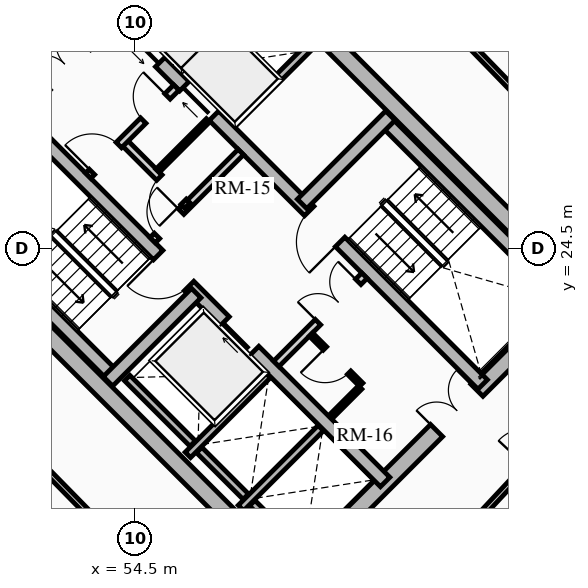
"""IFC4 building model, lengths in metres.
Left out: names, types, materials, properties, quantities, classifications, styles, units other than length and angle.
Written with IfcOpenShell. Run it as: python <this file> out.ifc"""

import sys

from ifc_helpers import new_model, si_unit, direction, frame, frame_2d, origin, place, context, subcontext, project, spatial, rectangle, extrude, source, transform, mapped, element, fill, save


model = new_model("IFC4")
c1 = context("Model", 3, precision=1e-05, world=origin(), true_north=direction((0.0, 1.0)))
c2 = subcontext(c1, "Body", "Model", "MODEL_VIEW")
j1 = project(units=[si_unit("LENGTHUNIT", "METRE"), si_unit("PLANEANGLEUNIT", "RADIAN")], contexts=[c1])
p1 = place(None, origin())
s1 = spatial("IfcSite", under=j1, at=p1, CompositionType="ELEMENT")
p2 = place(p1, origin())
s2 = spatial("IfcBuilding", under=s1, at=p2, CompositionType="ELEMENT")
p3 = place(p2, frame((0.0, 0.0, 73.06)))
s3 = spatial("IfcBuildingStorey", under=s2, at=p3, CompositionType="ELEMENT", Elevation=73.06)
for number, where, z_axis, x_axis in (
    (1, (58.737, 15.697, 0.0), (0.0, 0.0, 1.0), (-0.707, 0.707, 0.0)),
    (2, (66.303, 23.263, 0.0), (0.0, 0.0, 1.0), (-0.707, 0.707, 0.0)),
):
    element("IfcWall", number, at=place(p3, frame(where, z_axis=z_axis, x_axis=x_axis)), inside=s3, PredefinedType="SHEAR", context=c2, shape_type="SweptSolid", body=[
        extrude(rectangle(XDim=14.2, YDim=0.45, at=frame_2d((7.1, 0.0))), origin(), (0.0, 0.0, 1.0), 2.91),
    ])
p4 = place(p3, frame((58.578, 15.856, 0.0), z_axis=(0.0, 0.0, 1.0), x_axis=(0.707106781187, 0.707106781187, 0.0)))
e3 = element("IfcWall", 3, at=p4, inside=s3, PredefinedType="SHEAR", context=c2, shape_type="SweptSolid", body=[
    extrude(rectangle(XDim=10.7, YDim=0.45, at=frame_2d((5.35, 0.0))), origin(), (0.0, 0.0, 1.0), 2.91),
])
m1 = source(origin(), c2, "Body", "SweptSolid", [
    extrude(rectangle(XDim=1.5, YDim=2.02, at=frame_2d((0.75, 1.01))), frame((0.0, 0.235, 0.0), z_axis=(0.0, -1.0, 0.0), x_axis=(1.0, 0.0, 0.0)), (0.0, 0.0, 1.0), 0.47),
])
p5 = place(p4, frame((5.45, 0.0, 0.0)))
e4 = element("IfcOpeningElement", 4, at=p5, cuts=e3, PredefinedType="OPENING", context=c2, shape_type="MappedRepresentation", body=[
    mapped(m1, transform((0.0, 0.0, 0.0), x_axis=(1.0, 0.0, 0.0), y_axis=(0.0, 1.0, 0.0), z_axis=(0.0, 0.0, 1.0), scale=1.0)),
])
p6 = place(p3, frame((48.856, 25.578, 0.0), z_axis=(0.0, 0.0, 1.0), x_axis=(0.707106781187, 0.707106781187, 0.0)))
e5 = element("IfcWall", 5, at=p6, inside=s3, PredefinedType="SHEAR", context=c2, shape_type="SweptSolid", body=[
    extrude(rectangle(XDim=10.7, YDim=0.45, at=frame_2d((5.35, 0.0))), origin(), (0.0, 0.0, 1.0), 2.91),
])
p7 = place(p6, frame((4.6, 0.0, 0.0)))
e6 = element("IfcOpeningElement", 6, at=p7, cuts=e5, PredefinedType="OPENING", context=c2, shape_type="MappedRepresentation", body=[
    mapped(m1, transform((0.0, 0.0, 0.0), x_axis=(1.0, 0.0, 0.0), y_axis=(0.0, 1.0, 0.0), z_axis=(0.0, 0.0, 1.0), scale=1.0)),
])
p8 = place(p3, frame((61.078, 18.355, 0.0), z_axis=(0.0, 0.0, 1.0), x_axis=(-0.707106781187, 0.707106781187, 0.0)))
e7 = element("IfcWall", 7, at=p8, inside=s3, PredefinedType="SHEAR", context=c2, shape_type="SweptSolid", body=[
    extrude(rectangle(XDim=13.75, YDim=0.35, at=frame_2d((6.875, 0.0))), origin(), (0.0, 0.0, 1.0), 2.91),
])
m2 = source(origin(), c2, "Body", "SweptSolid", [
    extrude(rectangle(XDim=1.1, YDim=2.015, at=frame_2d((0.55, 1.007))), frame((0.0, 0.185, 0.0), z_axis=(0.0, -1.0, 0.0), x_axis=(1.0, 0.0, 0.0)), (0.0, 0.0, 1.0), 0.37),
])
p9 = place(p8, frame((4.875, 0.0, 0.0)))
e8 = element("IfcOpeningElement", 8, at=p9, cuts=e7, PredefinedType="OPENING", context=c2, shape_type="MappedRepresentation", body=[
    mapped(m2, transform((0.0, 0.0, 0.0), x_axis=(1.0, 0.0, 0.0), y_axis=(0.0, 1.0, 0.0), z_axis=(0.0, 0.0, 1.0), scale=1.0)),
])
m3 = source(origin(), c2, "Body", "SweptSolid", [
    extrude(rectangle(XDim=1.15, YDim=2.02, at=frame_2d((0.575, 1.01))), frame((0.0, 0.185, 0.0), z_axis=(0.0, -1.0, 0.0), x_axis=(1.0, 0.0, 0.0)), (0.0, 0.0, 1.0), 0.37),
])
p10 = place(p8, frame((7.295, 0.0, 0.0)))
e9 = element("IfcOpeningElement", 9, at=p10, cuts=e7, PredefinedType="OPENING", context=c2, shape_type="MappedRepresentation", body=[
    mapped(m3, transform((0.0, 0.0, 0.0), x_axis=(1.0, 0.0, 0.0), y_axis=(0.0, 1.0, 0.0), z_axis=(0.0, 0.0, 1.0), scale=1.0)),
])
p11 = place(p3, frame((63.645, 20.922, 0.0), z_axis=(0.0, 0.0, 1.0), x_axis=(-0.707106781187, 0.707106781187, 0.0)))
e10 = element("IfcWall", 10, at=p11, inside=s3, PredefinedType="SHEAR", context=c2, shape_type="SweptSolid", body=[
    extrude(rectangle(XDim=13.75, YDim=0.35, at=frame_2d((6.875, 0.0))), origin(), (0.0, 0.0, 1.0), 2.91),
])
p12 = place(p11, frame((10.0, 0.0, 0.0)))
e11 = element("IfcOpeningElement", 11, at=p12, cuts=e10, PredefinedType="OPENING", context=c2, shape_type="MappedRepresentation", body=[
    mapped(m2, transform((0.0, 0.0, 0.0), x_axis=(1.0, 0.0, 0.0), y_axis=(0.0, 1.0, 0.0), z_axis=(0.0, 0.0, 1.0), scale=1.0)),
])
p13 = place(p11, frame((12.0, 0.0, 0.0)))
e12 = element("IfcOpeningElement", 12, at=p13, cuts=e10, PredefinedType="OPENING", context=c2, shape_type="MappedRepresentation", body=[
    mapped(m2, transform((0.0, 0.0, 0.0), x_axis=(1.0, 0.0, 0.0), y_axis=(0.0, 1.0, 0.0), z_axis=(0.0, 0.0, 1.0), scale=1.0)),
])
p14 = place(p11, frame((5.305, 0.0, 0.0)))
e13 = element("IfcOpeningElement", 13, at=p14, cuts=e10, PredefinedType="OPENING", context=c2, shape_type="MappedRepresentation", body=[
    mapped(m3, transform((0.0, 0.0, 0.0), x_axis=(1.0, 0.0, 0.0), y_axis=(0.0, 1.0, 0.0), z_axis=(0.0, 0.0, 1.0), scale=1.0)),
])
p15 = place(p3, frame((53.922, 21.141, 0.0), z_axis=(0.0, 0.0, 1.0), x_axis=(-0.707088616009, 0.707124945897, 0.0)))
e14 = element("IfcWall", 14, at=p15, inside=s3, PredefinedType="SHEAR", context=c2, shape_type="SweptSolid", body=[
    extrude(rectangle(XDim=6.72, YDim=0.35, at=frame_2d((3.36, 0.0))), origin(), (0.0, 0.0, 1.0), 2.91),
])
p16 = place(p3, frame((53.784, 21.003, 0.0), z_axis=(0.0, 0.0, 1.0), x_axis=(0.707106781187, 0.707106781187, 0.0)))
e15 = element("IfcWall", 15, at=p16, inside=s3, PredefinedType="SHEAR", context=c2, shape_type="SweptSolid", body=[
    extrude(rectangle(XDim=3.285, YDim=0.35, at=frame_2d((1.643, 0.0))), origin(), (0.0, 0.0, 1.0), 2.91),
])
p17 = place(p3, frame((65.83, 23.107, 0.0), z_axis=(0.0, 0.0, 1.0), x_axis=(-0.707088616009, 0.707124945897, 0.0)))
e16 = element("IfcWall", 16, at=p17, inside=s3, PredefinedType="SHEAR", context=c2, shape_type="SweptSolid", body=[
    extrude(rectangle(XDim=6.72, YDim=0.35, at=frame_2d((3.36, 0.0))), origin(), (0.0, 0.0, 1.0), 2.91),
])
p18 = place(p3, frame((58.893, 25.674, 0.0), z_axis=(0.0, 0.0, 1.0), x_axis=(0.707106781187, 0.707106781187, 0.0)))
e17 = element("IfcWall", 17, at=p18, inside=s3, PredefinedType="SHEAR", context=c2, shape_type="SweptSolid", body=[
    extrude(rectangle(XDim=3.285, YDim=0.35, at=frame_2d((1.643, 0.0))), origin(), (0.0, 0.0, 1.0), 2.91),
])
p19 = place(p3, frame((55.888, 19.069, 0.0), z_axis=(0.0, 0.0, 1.0), x_axis=(0.707106781187, 0.707106781187, 0.0)))
e18 = element("IfcWall", 18, at=p19, inside=s3, PredefinedType="SHEAR", context=c2, shape_type="SweptSolid", body=[
    extrude(rectangle(XDim=2.97, YDim=0.2, at=frame_2d((1.485, 0.0))), origin(), (0.0, 0.0, 1.0), 2.91),
])
p20 = place(p3, frame((56.015, 19.366, 0.0), z_axis=(0.0, 0.0, 1.0), x_axis=(-0.707106781187, 0.707106781187, 0.0)))
e19 = element("IfcWall", 19, at=p20, inside=s3, PredefinedType="SHEAR", context=c2, shape_type="SweptSolid", body=[
    extrude(rectangle(XDim=2.44, YDim=0.2, at=frame_2d((1.22, 0.0))), origin(), (0.0, 0.0, 1.0), 2.91),
])
p21 = place(p3, frame((57.284, 17.673, 0.0), z_axis=(0.0, 0.0, 1.0), x_axis=(0.707147878904, 0.70706568108, 0.0)))
e20 = element("IfcWall", 20, at=p21, inside=s3, PredefinedType="SHEAR", context=c2, shape_type="SweptSolid", body=[
    extrude(rectangle(XDim=2.97, YDim=0.2, at=frame_2d((1.485, 0.0))), origin(), (0.0, 0.0, 1.0), 2.91),
])
p22 = place(p3, frame((57.412, 17.97, 0.0), z_axis=(0.0, 0.0, 1.0), x_axis=(-0.707106781187, 0.707106781187, 0.0)))
e21 = element("IfcWall", 21, at=p22, inside=s3, PredefinedType="SHEAR", context=c2, shape_type="SweptSolid", body=[
    extrude(rectangle(XDim=1.735, YDim=0.2, at=frame_2d((0.867, 0.0))), origin(), (0.0, 0.0, 1.0), 2.91),
])
p23 = place(p3, frame((58.737, 16.644, 0.0), z_axis=(0.0, 0.0, 1.0), x_axis=(-0.707032117043, 0.707181437447, 0.0)))
e22 = element("IfcWall", 22, at=p23, inside=s3, PredefinedType="SHEAR", context=c2, shape_type="SweptSolid", body=[
    extrude(rectangle(XDim=1.635, YDim=0.2, at=frame_2d((0.817, 0.0))), origin(), (0.0, 0.0, 1.0), 2.91),
])
p24 = place(p3, frame((57.062, 27.781, 0.0), z_axis=(0.0, 0.0, 1.0), x_axis=(0.707106781187, 0.707106781187, 0.0)))
e23 = element("IfcWall", 23, at=p24, inside=s3, PredefinedType="SHEAR", context=c2, shape_type="SweptSolid", body=[
    extrude(rectangle(XDim=2.97, YDim=0.2, at=frame_2d((1.485, 0.0))), origin(), (0.0, 0.0, 1.0), 2.91),
])
p25 = place(p3, frame((55.615, 29.227, 0.0), z_axis=(0.0, 0.0, 1.0), x_axis=(0.707147878904, 0.70706568108, 0.0)))
e24 = element("IfcWall", 24, at=p25, inside=s3, PredefinedType="SHEAR", context=c2, shape_type="SweptSolid", body=[
    extrude(rectangle(XDim=2.97, YDim=0.2, at=frame_2d((1.485, 0.0))), origin(), (0.0, 0.0, 1.0), 2.91),
])
p26 = place(p3, frame((58.214, 21.467, 0.0), z_axis=(0.0, 0.0, 1.0), x_axis=(0.707106781187, 0.707106781187, 0.0)))
e25 = element("IfcWall", 25, at=p26, inside=s3, PredefinedType="PARTITIONING", context=c2, shape_type="SweptSolid", body=[
    extrude(rectangle(XDim=3.28, YDim=0.2, at=frame_2d((1.64, 0.0))), origin(), (0.0, 0.0, 1.0), 2.655),
])
m4 = source(origin(), c2, "Body", "SweptSolid", [
    extrude(rectangle(XDim=1.5, YDim=2.02, at=frame_2d((0.75, 1.01))), frame((0.0, 0.11, 0.0), z_axis=(0.0, -1.0, 0.0), x_axis=(1.0, 0.0, 0.0)), (0.0, 0.0, 1.0), 0.22),
])
p27 = place(p26, frame((1.55, 0.0, 0.0)))
e26 = element("IfcOpeningElement", 26, at=p27, cuts=e25, PredefinedType="OPENING", context=c2, shape_type="MappedRepresentation", body=[
    mapped(m4, transform((0.0, 0.0, 0.0), x_axis=(1.0, 0.0, 0.0), y_axis=(0.0, 1.0, 0.0), z_axis=(0.0, 0.0, 1.0), scale=1.0)),
])
p28 = place(p3, frame((54.961, 24.719, 0.0), z_axis=(0.0, 0.0, 1.0), x_axis=(0.707106781187, 0.707106781187, 0.0)))
e27 = element("IfcWall", 27, at=p28, inside=s3, PredefinedType="PARTITIONING", context=c2, shape_type="SweptSolid", body=[
    extrude(rectangle(XDim=3.28, YDim=0.2, at=frame_2d((1.64, 0.0))), origin(), (0.0, 0.0, 1.0), 2.655),
])
m5 = source(origin(), c2, "Body", "SweptSolid", [
    extrude(rectangle(XDim=0.9, YDim=2.005, at=frame_2d((0.45, 1.002))), frame((0.0, 0.11, 0.0), z_axis=(0.0, -1.0, 0.0), x_axis=(1.0, 0.0, 0.0)), (0.0, 0.0, 1.0), 0.22),
])
p29 = place(p28, frame((0.16, 0.0, 0.0)))
e28 = element("IfcOpeningElement", 28, at=p29, cuts=e27, PredefinedType="OPENING", context=c2, shape_type="MappedRepresentation", body=[
    mapped(m5, transform((0.0, 0.0, 0.0), x_axis=(1.0, 0.0, 0.0), y_axis=(0.0, 1.0, 0.0), z_axis=(0.0, 0.0, 1.0), scale=1.0)),
])
p30 = place(p3, frame((55.874, 25.631, 0.0), z_axis=(0.0, 0.0, 1.0), x_axis=(-0.707157639372, 0.707055919343, 0.0)))
e29 = element("IfcWall", 29, at=p30, inside=s3, PredefinedType="PARTITIONING", context=c2, shape_type="SweptSolid", body=[
    extrude(rectangle(XDim=2.4, YDim=0.2, at=frame_2d((1.2, 0.0))), origin(), (0.0, 0.0, 1.0), 2.655),
])
p31 = place(p30, frame((0.14, 0.0, 0.0)))
e30 = element("IfcOpeningElement", 30, at=p31, cuts=e29, PredefinedType="OPENING", context=c2, shape_type="MappedRepresentation", body=[
    mapped(m5, transform((0.0, 0.0, 0.0), x_axis=(1.0, 0.0, 0.0), y_axis=(0.0, 1.0, 0.0), z_axis=(0.0, 0.0, 1.0), scale=1.0)),
])
p32 = place(p3, frame((53.264, 26.416, 0.0), z_axis=(0.0, 0.0, 1.0), x_axis=(0.707106781187, 0.707106781187, 0.0)))
e31 = element("IfcWall", 31, at=p32, inside=s3, PredefinedType="PARTITIONING", context=c2, shape_type="SweptSolid", body=[
    extrude(rectangle(XDim=3.28, YDim=0.2, at=frame_2d((1.64, 0.0))), origin(), (0.0, 0.0, 1.0), 2.655),
])
m6 = source(origin(), c2, "Body", "SweptSolid", [
    extrude(rectangle(XDim=1.0, YDim=2.015, at=frame_2d((0.5, 1.007))), frame((0.0, 0.11, 0.0), z_axis=(0.0, -1.0, 0.0), x_axis=(1.0, 0.0, 0.0)), (0.0, 0.0, 1.0), 0.22),
])
p33 = place(p32, frame((0.14, 0.0, 0.0)))
e32 = element("IfcOpeningElement", 32, at=p33, cuts=e31, PredefinedType="OPENING", context=c2, shape_type="MappedRepresentation", body=[
    mapped(m6, transform((0.0, 0.0, 0.0), x_axis=(1.0, 0.0, 0.0), y_axis=(0.0, 1.0, 0.0), z_axis=(0.0, 0.0, 1.0), scale=1.0)),
])
p34 = place(p32, frame((2.05, 0.0, 0.0)))
e33 = element("IfcOpeningElement", 33, at=p34, cuts=e31, PredefinedType="OPENING", context=c2, shape_type="MappedRepresentation", body=[
    mapped(m5, transform((0.0, 0.0, 0.0), x_axis=(1.0, 0.0, 0.0), y_axis=(0.0, 1.0, 0.0), z_axis=(0.0, 0.0, 1.0), scale=1.0)),
])
p35 = place(p3, frame((60.448, 20.915, 0.0), z_axis=(0.0, 0.0, 1.0), x_axis=(-0.707106781187, 0.707106781187, 0.0)))
e34 = element("IfcWall", 34, at=p35, inside=s3, PredefinedType="PARTITIONING", context=c2, shape_type="SweptSolid", body=[
    extrude(rectangle(XDim=1.87, YDim=0.125, at=frame_2d((0.935, 0.0))), origin(), (0.0, 0.0, 1.0), 2.655),
])
m7 = source(origin(), c2, "Body", "SweptSolid", [
    extrude(rectangle(XDim=0.9, YDim=2.005, at=frame_2d((0.45, 1.002))), frame((0.0, 0.073, 0.0), z_axis=(0.0, -1.0, 0.0), x_axis=(1.0, 0.0, 0.0)), (0.0, 0.0, 1.0), 0.145),
])
p36 = place(p35, frame((0.45, 0.0, 0.0)))
e35 = element("IfcOpeningElement", 35, at=p36, cuts=e34, PredefinedType="OPENING", context=c2, shape_type="MappedRepresentation", body=[
    mapped(m7, transform((0.0, 0.0, 0.0), x_axis=(1.0, 0.0, 0.0), y_axis=(0.0, 1.0, 0.0), z_axis=(0.0, 0.0, 1.0), scale=1.0)),
])
p37 = place(p3, frame((59.643, 20.066, 0.0), z_axis=(0.0, 0.0, 1.0), x_axis=(0.707106781187, 0.707106781187, 0.0)))
e36 = element("IfcWall", 36, at=p37, inside=s3, PredefinedType="PARTITIONING", context=c2, shape_type="SweptSolid", body=[
    extrude(rectangle(XDim=1.1, YDim=0.125, at=frame_2d((0.55, 0.0))), origin(), (0.0, 0.0, 1.0), 2.655),
])
p38 = place(p3, frame((55.089, 26.543, 0.0), z_axis=(0.0, 0.0, 1.0), x_axis=(0.707106781187, 0.707106781187, 0.0)))
e37 = element("IfcWall", 37, at=p38, inside=s3, PredefinedType="PARTITIONING", context=c2, shape_type="SweptSolid", body=[
    extrude(rectangle(XDim=1.88, YDim=0.125, at=frame_2d((0.94, 0.0))), origin(), (0.0, 0.0, 1.0), 2.655),
])
p39 = place(p3, frame((51.914, 18.914, 0.0), z_axis=(0.0, 0.0, 1.0), x_axis=(0.6999614951, -0.71418058317, 0.0)))
e38 = element("IfcWall", 38, at=p39, inside=s3, PredefinedType="PARTITIONING", context=c2, shape_type="SweptSolid", body=[
    extrude(rectangle(XDim=6.13, YDim=0.15, at=frame_2d((3.065, 0.0))), origin(), (0.0, 0.0, 1.0), 2.225),
])
m8 = source(origin(), c2, "Body", "SweptSolid", [
    extrude(rectangle(XDim=1.05, YDim=2.015, at=frame_2d((0.525, 1.007))), frame((0.0, 0.085, 0.0), z_axis=(0.0, -1.0, 0.0), x_axis=(1.0, 0.0, 0.0)), (0.0, 0.0, 1.0), 0.17),
])
p40 = place(p39, frame((2.54, 0.0, 0.0)))
e39 = element("IfcOpeningElement", 39, at=p40, cuts=e38, PredefinedType="OPENING", context=c2, shape_type="MappedRepresentation", body=[
    mapped(m8, transform((0.0, 0.0, 0.0), x_axis=(1.0, 0.0, 0.0), y_axis=(0.0, 1.0, 0.0), z_axis=(0.0, 0.0, 1.0), scale=1.0)),
])
p41 = place(p3, frame((62.867, 16.702, 0.0), z_axis=(0.0, 0.0, 1.0), x_axis=(0.682449206191, 0.73093302085, 0.0)))
e40 = element("IfcWall", 40, at=p41, inside=s3, PredefinedType="PARTITIONING", context=c2, shape_type="SweptSolid", body=[
    extrude(rectangle(XDim=6.642, YDim=0.15, at=frame_2d((3.321, 0.0))), origin(), (0.0, 0.0, 1.0), 2.225),
])
m9 = source(origin(), c2, "Body", "SweptSolid", [
    extrude(rectangle(XDim=1.0, YDim=2.015, at=frame_2d((0.5, 1.007))), frame((0.0, 0.085, 0.0), z_axis=(0.0, -1.0, 0.0), x_axis=(1.0, 0.0, 0.0)), (0.0, 0.0, 1.0), 0.17),
])
p42 = place(p41, frame((2.821, 0.0, 0.0)))
e41 = element("IfcOpeningElement", 41, at=p42, cuts=e40, PredefinedType="OPENING", context=c2, shape_type="MappedRepresentation", body=[
    mapped(m9, transform((0.0, 0.0, 0.0), x_axis=(1.0, 0.0, 0.0), y_axis=(0.0, 1.0, 0.0), z_axis=(0.0, 0.0, 1.0), scale=1.0)),
])
p43 = place(p3, frame((67.247, 25.802, 0.0), z_axis=(0.0, 0.0, 1.0), x_axis=(-0.696771261687, 0.71729339108, 0.0)))
e42 = element("IfcWall", 42, at=p43, inside=s3, PredefinedType="PARTITIONING", context=c2, shape_type="SweptSolid", body=[
    extrude(rectangle(XDim=5.972, YDim=0.15, at=frame_2d((2.986, 0.0))), origin(), (0.0, 0.0, 1.0), 2.655),
])
m10 = source(origin(), c2, "Body", "SweptSolid", [
    extrude(rectangle(XDim=1.1, YDim=2.015, at=frame_2d((0.55, 1.007))), frame((0.0, 0.025, 0.0), z_axis=(0.0, -1.0, 0.0), x_axis=(1.0, 0.0, 0.0)), (0.0, 0.0, 1.0), 0.05),
])
p44 = place(p9, origin())
e43 = element("IfcDoor", 43, at=p44, inside=s3, OperationType="SLIDING_TO_RIGHT", PredefinedType="DOOR", context=c2, shape_type="MappedRepresentation", body=[
    mapped(m10, transform((0.0, 0.0, 0.0), x_axis=(1.0, 0.0, 0.0), y_axis=(0.0, 1.0, 0.0), z_axis=(0.0, 0.0, 1.0), scale=1.0)),
])
fill(e8, e43)
p45 = place(p12, origin())
e44 = element("IfcDoor", 44, at=p45, inside=s3, OperationType="SLIDING_TO_RIGHT", PredefinedType="DOOR", context=c2, shape_type="MappedRepresentation", body=[
    mapped(m10, transform((0.0, 0.0, 0.0), x_axis=(1.0, 0.0, 0.0), y_axis=(0.0, 1.0, 0.0), z_axis=(0.0, 0.0, 1.0), scale=1.0)),
])
fill(e11, e44)
p46 = place(p13, origin())
e45 = element("IfcDoor", 45, at=p46, inside=s3, OperationType="SLIDING_TO_LEFT", PredefinedType="DOOR", context=c2, shape_type="MappedRepresentation", body=[
    mapped(m10, transform((0.0, 0.0, 0.0), x_axis=(1.0, 0.0, 0.0), y_axis=(0.0, 1.0, 0.0), z_axis=(0.0, 0.0, 1.0), scale=1.0)),
])
fill(e12, e45)
m11 = source(origin(), c2, "Body", "SweptSolid", [
    extrude(rectangle(XDim=1.15, YDim=2.02, at=frame_2d((0.575, 1.01))), frame((0.0, 0.025, 0.0), z_axis=(0.0, -1.0, 0.0), x_axis=(1.0, 0.0, 0.0)), (0.0, 0.0, 1.0), 0.05),
])
p47 = place(p10, origin())
e46 = element("IfcDoor", 46, at=p47, inside=s3, OperationType="SINGLE_SWING_RIGHT", PredefinedType="DOOR", context=c2, shape_type="MappedRepresentation", body=[
    mapped(m11, transform((0.0, 0.0, 0.0), x_axis=(1.0, 0.0, 0.0), y_axis=(0.0, 1.0, 0.0), z_axis=(0.0, 0.0, 1.0), scale=1.0)),
])
fill(e9, e46)
p48 = place(p14, origin())
e47 = element("IfcDoor", 47, at=p48, inside=s3, OperationType="SINGLE_SWING_LEFT", PredefinedType="DOOR", context=c2, shape_type="MappedRepresentation", body=[
    mapped(m11, transform((0.0, 0.0, 0.0), x_axis=(1.0, 0.0, 0.0), y_axis=(0.0, 1.0, 0.0), z_axis=(0.0, 0.0, 1.0), scale=1.0)),
])
fill(e13, e47)
m12 = source(origin(), c2, "Body", "SweptSolid", [
    extrude(rectangle(XDim=1.5, YDim=2.02, at=frame_2d((0.75, 1.01))), frame((0.0, 0.025, 0.0), z_axis=(0.0, -1.0, 0.0), x_axis=(1.0, 0.0, 0.0)), (0.0, 0.0, 1.0), 0.05),
])
p49 = place(p7, origin())
e48 = element("IfcDoor", 48, at=p49, inside=s3, OperationType="DOUBLE_DOOR_SINGLE_SWING", PredefinedType="DOOR", context=c2, shape_type="MappedRepresentation", body=[
    mapped(m12, transform((0.0, 0.0, 0.0), x_axis=(1.0, 0.0, 0.0), y_axis=(0.0, 1.0, 0.0), z_axis=(0.0, 0.0, 1.0), scale=1.0)),
])
fill(e6, e48)
p50 = place(p5, origin())
e49 = element("IfcDoor", 49, at=p50, inside=s3, OperationType="DOUBLE_DOOR_SINGLE_SWING", PredefinedType="DOOR", context=c2, shape_type="MappedRepresentation", body=[
    mapped(m12, transform((0.0, 0.0, 0.0), x_axis=(1.0, 0.0, 0.0), y_axis=(0.0, 1.0, 0.0), z_axis=(0.0, 0.0, 1.0), scale=1.0)),
])
fill(e4, e49)
p51 = place(p27, origin())
e50 = element("IfcDoor", 50, at=p51, inside=s3, OperationType="DOUBLE_DOOR_SINGLE_SWING", PredefinedType="DOOR", context=c2, shape_type="MappedRepresentation", body=[
    mapped(m12, transform((0.0, 0.0, 0.0), x_axis=(1.0, 0.0, 0.0), y_axis=(0.0, 1.0, 0.0), z_axis=(0.0, 0.0, 1.0), scale=1.0)),
])
fill(e26, e50)
m13 = source(origin(), c2, "Body", "SweptSolid", [
    extrude(rectangle(XDim=0.9, YDim=2.005, at=frame_2d((0.45, 1.002))), frame((0.0, 0.025, 0.0), z_axis=(0.0, -1.0, 0.0), x_axis=(1.0, 0.0, 0.0)), (0.0, 0.0, 1.0), 0.05),
])
p52 = place(p29, origin())
e51 = element("IfcDoor", 51, at=p52, inside=s3, OperationType="SINGLE_SWING_RIGHT", PredefinedType="DOOR", context=c2, shape_type="MappedRepresentation", body=[
    mapped(m13, transform((0.0, 0.0, 0.0), x_axis=(1.0, 0.0, 0.0), y_axis=(0.0, 1.0, 0.0), z_axis=(0.0, 0.0, 1.0), scale=1.0)),
])
fill(e28, e51)
m14 = source(origin(), c2, "Body", "SweptSolid", [
    extrude(rectangle(XDim=1.0, YDim=2.015, at=frame_2d((0.5, 1.007))), frame((0.0, 0.025, 0.0), z_axis=(0.0, -1.0, 0.0), x_axis=(1.0, 0.0, 0.0)), (0.0, 0.0, 1.0), 0.05),
])
p53 = place(p33, origin())
e52 = element("IfcDoor", 52, at=p53, inside=s3, OperationType="SINGLE_SWING_LEFT", PredefinedType="DOOR", context=c2, shape_type="MappedRepresentation", body=[
    mapped(m14, transform((0.0, 0.0, 0.0), x_axis=(1.0, 0.0, 0.0), y_axis=(0.0, 1.0, 0.0), z_axis=(0.0, 0.0, 1.0), scale=1.0)),
])
fill(e32, e52)
p54 = place(p36, origin())
e53 = element("IfcDoor", 53, at=p54, inside=s3, OperationType="SINGLE_SWING_RIGHT", PredefinedType="DOOR", context=c2, shape_type="MappedRepresentation", body=[
    mapped(m13, transform((0.0, 0.0, 0.0), x_axis=(1.0, 0.0, 0.0), y_axis=(0.0, 1.0, 0.0), z_axis=(0.0, 0.0, 1.0), scale=1.0)),
])
fill(e35, e53)
p55 = place(p31, origin())
e54 = element("IfcDoor", 54, at=p55, inside=s3, OperationType="SINGLE_SWING_LEFT", PredefinedType="DOOR", context=c2, shape_type="MappedRepresentation", body=[
    mapped(m13, transform((0.0, 0.0, 0.0), x_axis=(1.0, 0.0, 0.0), y_axis=(0.0, 1.0, 0.0), z_axis=(0.0, 0.0, 1.0), scale=1.0)),
])
fill(e30, e54)
p56 = place(p34, origin())
e55 = element("IfcDoor", 55, at=p56, inside=s3, OperationType="SINGLE_SWING_RIGHT", PredefinedType="DOOR", context=c2, shape_type="MappedRepresentation", body=[
    mapped(m13, transform((0.0, 0.0, 0.0), x_axis=(1.0, 0.0, 0.0), y_axis=(0.0, 1.0, 0.0), z_axis=(0.0, 0.0, 1.0), scale=1.0)),
])
fill(e33, e55)
save(model, sys.argv[1])
